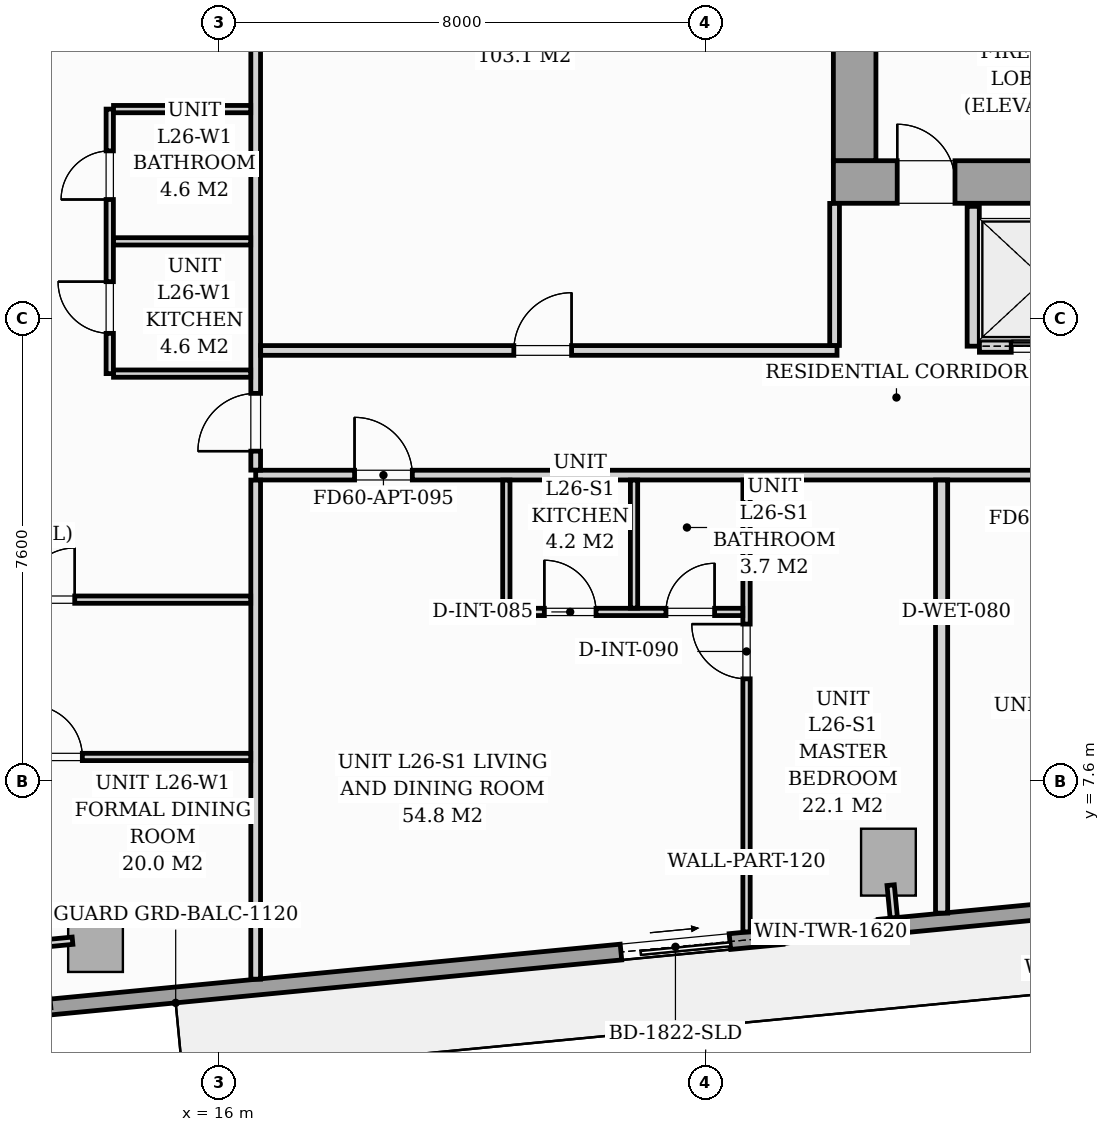
"""IFC4 building model, lengths in metres.
Left out: names, types, materials, properties, quantities, classifications, styles, units other than length and angle.
Written with IfcOpenShell. Run it as: python <this file> out.ifc"""

import sys

from ifc_helpers import new_model, si_unit, direction, frame, frame_2d, origin, origin_2d, place, context, subcontext, project, spatial, rectangle, i_section, extrude, source, transform, mapped, element, fill, save


model = new_model("IFC4")
c1 = context("Model", 3, precision=1e-05, world=origin(), true_north=direction((0.0, 1.0)))
c2 = subcontext(c1, "Body", "Model", "MODEL_VIEW")
j1 = project(units=[si_unit("LENGTHUNIT", "METRE"), si_unit("PLANEANGLEUNIT", "RADIAN")], contexts=[c1])
p1 = place(None, origin())
s1 = spatial("IfcSite", under=j1, at=p1, CompositionType="ELEMENT")
p2 = place(p1, origin())
s2 = spatial("IfcBuilding", under=s1, at=p2, CompositionType="ELEMENT")
p3 = place(p2, frame((0.0, 0.0, 93.8)))
s3 = spatial("IfcBuildingStorey", under=s2, at=p3, CompositionType="ELEMENT", Elevation=93.8)
m1 = source(origin(), c2, "Body", "SweptSolid", [
    extrude(i_section(OverallWidth=0.427, OverallDepth=0.483, WebThickness=0.051, FlangeThickness=0.082, FilletRadius=0.018, at=origin_2d()), origin(), (0.0, 0.0, 1.0), 3.196),
])
p4 = place(p3, frame((26.4, 17.4, 0.002), z_axis=(0.0, 0.0, 1.0), x_axis=(1.0, 0.0, 0.0)))
e1 = element("IfcColumn", 1, at=p4, inside=s3, PredefinedType="PILASTER", context=c2, shape_type="MappedRepresentation", body=[
    mapped(m1, transform((0.0, 0.0, 0.0), scale=1.0)),
])
m2 = source(origin(), c2, "Body", "SweptSolid", [
    extrude(rectangle(XDim=0.9, YDim=1.1, at=origin_2d()), origin(), (0.0, 0.0, 1.0), 3.196),
])
for number, where, z_axis, x_axis in (
    (2, (13.966, 5.01, 0.002), (0.0, 0.0, 1.0), (0.995, 0.096, 0.0)),
    (3, (27.006, 6.265, 0.002), (0.0, 0.0, 1.0), (0.995, 0.096, 0.0)),
):
    element("IfcColumn", number, at=place(p3, frame(where, z_axis=z_axis, x_axis=x_axis)), inside=s3, PredefinedType="COLUMN", context=c2, shape_type="MappedRepresentation", body=[
        mapped(m2, transform((0.0, 0.0, 0.0), scale=1.0)),
    ])
p5 = place(p3, frame((31.994, 5.69, 0.0), z_axis=(0.0, 0.0, 1.0), x_axis=(-0.995396521236, -0.095842399342, 0.0)))
e4 = element("IfcWall", 4, at=p5, inside=s3, PredefinedType="STANDARD", context=c2, shape_type="SweptSolid", body=[
    extrude(rectangle(XDim=19.11, YDim=0.26, at=frame_2d((9.555, 0.0))), origin(), (0.0, 0.0, 1.0), 2.94),
])
p6 = place(p5, frame((7.63, 0.0, 0.0)))
e5 = element("IfcOpeningElement", 5, at=p6, cuts=e4, PredefinedType="OPENING", context=c2, shape_type="SweptSolid", body=[
    extrude(rectangle(XDim=1.8, YDim=2.06, at=frame_2d((0.9, 1.03))), frame((0.0, 0.14, 0.0), z_axis=(0.0, -1.0, 0.0), x_axis=(1.0, 0.0, 0.0)), (0.0, 0.0, 1.0), 0.28),
])
p7 = place(p5, frame((0.7, 0.0, 0.65)))
e6 = element("IfcOpeningElement", 6, at=p7, cuts=e4, PredefinedType="OPENING", context=c2, shape_type="SweptSolid", body=[
    extrude(rectangle(XDim=1.6, YDim=1.5, at=frame_2d((0.8, 0.75))), frame((0.0, 0.14, 0.0), z_axis=(0.0, -1.0, 0.0), x_axis=(1.0, 0.0, 0.0)), (0.0, 0.0, 1.0), 0.28),
])
p8 = place(p5, frame((5.167, 0.0, 0.75)))
e7 = element("IfcOpeningElement", 7, at=p8, cuts=e4, PredefinedType="OPENING", context=c2, shape_type="SweptSolid", body=[
    extrude(rectangle(XDim=1.6, YDim=1.5, at=frame_2d((0.8, 0.75))), frame((0.0, 0.14, 0.0), z_axis=(0.0, -1.0, 0.0), x_axis=(1.0, 0.0, 0.0)), (0.0, 0.0, 1.0), 0.28),
])
p9 = place(p3, frame((26.1, 17.45, 0.0), z_axis=(0.0, 0.0, 1.0), x_axis=(1.0, 0.0, 0.0)))
e8 = element("IfcWall", 8, at=p9, inside=s3, PredefinedType="SHEAR", context=c2, shape_type="SweptSolid", body=[
    extrude(rectangle(XDim=19.8, YDim=0.7, at=frame_2d((9.9, 0.0))), origin(), (0.0, 0.0, 1.0), 3.2),
])
p10 = place(p9, frame((1.05, 0.0, 0.0)))
e9 = element("IfcOpeningElement", 9, at=p10, cuts=e8, PredefinedType="OPENING", context=c2, shape_type="SweptSolid", body=[
    extrude(rectangle(XDim=0.95, YDim=2.06, at=frame_2d((0.475, 1.03))), frame((0.0, 0.36, 0.0), z_axis=(0.0, -1.0, 0.0), x_axis=(1.0, 0.0, 0.0)), (0.0, 0.0, 1.0), 0.72),
])
p11 = place(p9, frame((9.48, 0.0, 0.0)))
e10 = element("IfcOpeningElement", 10, at=p11, cuts=e8, PredefinedType="OPENING", context=c2, shape_type="SweptSolid", body=[
    extrude(rectangle(XDim=0.85, YDim=2.0, at=frame_2d((0.425, 1.0))), frame((0.0, 0.36, 0.0), z_axis=(0.0, -1.0, 0.0), x_axis=(1.0, 0.0, 0.0)), (0.0, 0.0, 1.0), 0.72),
])
p12 = place(p9, frame((17.65, 0.0, 0.0)))
e11 = element("IfcOpeningElement", 11, at=p12, cuts=e8, PredefinedType="OPENING", context=c2, shape_type="SweptSolid", body=[
    extrude(rectangle(XDim=0.95, YDim=2.06, at=frame_2d((0.475, 1.03))), frame((0.0, 0.36, 0.0), z_axis=(0.0, -1.0, 0.0), x_axis=(1.0, 0.0, 0.0)), (0.0, 0.0, 1.0), 0.72),
])
p13 = place(p3, frame((26.45, 17.802, 0.0), z_axis=(0.0, 0.0, 1.0), x_axis=(0.0, 1.0, 0.0)))
e12 = element("IfcWall", 12, at=p13, inside=s3, PredefinedType="SHEAR", context=c2, shape_type="SweptSolid", body=[
    extrude(rectangle(XDim=5.796, YDim=0.7, at=frame_2d((2.898, 0.0))), origin(), (0.0, 0.0, 1.0), 3.2),
])
p14 = place(p3, frame((28.4, 14.75, 0.0), z_axis=(0.0, 0.0, 1.0), x_axis=(0.0, 1.0, 0.0)))
e13 = element("IfcWall", 13, at=p14, inside=s3, PredefinedType="PARTITIONING", context=c2, shape_type="SweptSolid", body=[
    extrude(rectangle(XDim=2.3, YDim=0.2, at=frame_2d((1.15, 0.0))), origin(), (0.0, 0.0, 1.0), 2.94),
])
p15 = place(p3, frame((28.502, 14.75, 0.0), z_axis=(0.0, 0.0, 1.0), x_axis=(1.0, 0.0, 0.0)))
e14 = element("IfcWall", 14, at=p15, inside=s3, PredefinedType="PARTITIONING", context=c2, shape_type="SweptSolid", body=[
    extrude(rectangle(XDim=2.146, YDim=0.2, at=frame_2d((1.073, 0.0))), origin(), (0.0, 0.0, 1.0), 2.94),
])
p16 = place(p15, frame((0.523, 0.0, 0.0)))
e15 = element("IfcOpeningElement", 15, at=p16, cuts=e14, PredefinedType="OPENING", context=c2, shape_type="SweptSolid", body=[
    extrude(rectangle(XDim=1.05, YDim=2.08, at=frame_2d((0.525, 1.04))), frame((0.0, 0.11, 0.0), z_axis=(0.0, -1.0, 0.0), x_axis=(1.0, 0.0, 0.0)), (0.0, 0.0, 1.0), 0.22),
])
p17 = place(p3, frame((16.6, 12.63, 0.0), z_axis=(0.0, 0.0, 1.0), x_axis=(1.0, 0.0, 0.0)))
e16 = element("IfcWall", 16, at=p17, inside=s3, PredefinedType="PARTITIONING", context=c2, shape_type="SweptSolid", body=[
    extrude(rectangle(XDim=37.6, YDim=0.16, at=frame_2d((18.8, 0.0))), origin(), (0.0, 0.0, 1.0), 2.94),
])
p18 = place(p17, frame((1.626, 0.0, 0.0)))
e17 = element("IfcOpeningElement", 17, at=p18, cuts=e16, PredefinedType="OPENING", context=c2, shape_type="SweptSolid", body=[
    extrude(rectangle(XDim=0.95, YDim=2.06, at=frame_2d((0.475, 1.03))), frame((0.0, 0.09, 0.0), z_axis=(0.0, -1.0, 0.0), x_axis=(1.0, 0.0, 0.0)), (0.0, 0.0, 1.0), 0.18),
])
p19 = place(p17, frame((13.46, 0.0, 0.0)))
e18 = element("IfcOpeningElement", 18, at=p19, cuts=e16, PredefinedType="OPENING", context=c2, shape_type="SweptSolid", body=[
    extrude(rectangle(XDim=0.95, YDim=2.06, at=frame_2d((0.475, 1.03))), frame((0.0, 0.09, 0.0), z_axis=(0.0, -1.0, 0.0), x_axis=(1.0, 0.0, 0.0)), (0.0, 0.0, 1.0), 0.18),
])
p20 = place(p17, frame((26.522, 0.0, 0.0)))
e19 = element("IfcOpeningElement", 19, at=p20, cuts=e16, PredefinedType="OPENING", context=c2, shape_type="SweptSolid", body=[
    extrude(rectangle(XDim=0.95, YDim=2.06, at=frame_2d((0.475, 1.03))), frame((0.0, 0.09, 0.0), z_axis=(0.0, -1.0, 0.0), x_axis=(1.0, 0.0, 0.0)), (0.0, 0.0, 1.0), 0.18),
])
p21 = place(p3, frame((16.6, 4.341, 0.0), z_axis=(0.0, 0.0, 1.0), x_axis=(0.0, 1.0, 0.0)))
e20 = element("IfcWall", 20, at=p21, inside=s3, PredefinedType="PARTITIONING", context=c2, shape_type="SweptSolid", body=[
    extrude(rectangle(XDim=8.207, YDim=0.16, at=frame_2d((4.104, 0.0))), origin(), (0.0, 0.0, 1.0), 2.94),
])
p22 = place(p3, frame((16.6, 12.712, 0.0), z_axis=(0.0, 0.0, 1.0), x_axis=(0.0, 1.0, 0.0)))
e21 = element("IfcWall", 21, at=p22, inside=s3, PredefinedType="PARTITIONING", context=c2, shape_type="SweptSolid", body=[
    extrude(rectangle(XDim=11.195, YDim=0.16, at=frame_2d((5.598, 0.0))), origin(), (0.0, 0.0, 1.0), 2.94),
])
p23 = place(p22, frame((0.312, 0.0, 0.0)))
e22 = element("IfcOpeningElement", 22, at=p23, cuts=e21, PredefinedType="OPENING", context=c2, shape_type="SweptSolid", body=[
    extrude(rectangle(XDim=0.95, YDim=2.06, at=frame_2d((0.475, 1.03))), frame((0.0, 0.09, 0.0), z_axis=(0.0, -1.0, 0.0), x_axis=(1.0, 0.0, 0.0)), (0.0, 0.0, 1.0), 0.18),
])
p24 = place(p3, frame((24.672, 5.118, 0.0), z_axis=(0.0, 0.0, 1.0), x_axis=(0.0, 1.0, 0.0)))
e23 = element("IfcWall", 23, at=p24, inside=s3, PredefinedType="PARTITIONING", context=c2, shape_type="SweptSolid", body=[
    extrude(rectangle(XDim=7.43, YDim=0.12, at=frame_2d((3.715, 0.0))), origin(), (0.0, 0.0, 1.0), 2.94),
])
p25 = place(p24, frame((4.162, 0.0, 0.0)))
e24 = element("IfcOpeningElement", 24, at=p25, cuts=e23, PredefinedType="OPENING", context=c2, shape_type="SweptSolid", body=[
    extrude(rectangle(XDim=0.9, YDim=2.05, at=frame_2d((0.45, 1.025))), frame((0.0, 0.07, 0.0), z_axis=(0.0, -1.0, 0.0), x_axis=(1.0, 0.0, 0.0)), (0.0, 0.0, 1.0), 0.14),
])
p26 = place(p3, frame((20.722, 10.38, 0.0), z_axis=(0.0, 0.0, 1.0), x_axis=(1.0, 0.0, 0.0)))
e25 = element("IfcWall", 25, at=p26, inside=s3, PredefinedType="PARTITIONING", context=c2, shape_type="SweptSolid", body=[
    extrude(rectangle(XDim=3.888, YDim=0.12, at=frame_2d((1.944, 0.0))), origin(), (0.0, 0.0, 1.0), 2.94),
])
p27 = place(p26, frame((0.625, 0.0, 0.0)))
e26 = element("IfcOpeningElement", 26, at=p27, cuts=e25, PredefinedType="OPENING", context=c2, shape_type="SweptSolid", body=[
    extrude(rectangle(XDim=0.85, YDim=2.05, at=frame_2d((0.425, 1.025))), frame((0.0, 0.07, 0.0), z_axis=(0.0, -1.0, 0.0), x_axis=(1.0, 0.0, 0.0)), (0.0, 0.0, 1.0), 0.14),
])
p28 = place(p26, frame((2.625, 0.0, 0.0)))
e27 = element("IfcOpeningElement", 27, at=p28, cuts=e25, PredefinedType="OPENING", context=c2, shape_type="SweptSolid", body=[
    extrude(rectangle(XDim=0.8, YDim=2.02, at=frame_2d((0.4, 1.01))), frame((0.0, 0.07, 0.0), z_axis=(0.0, -1.0, 0.0), x_axis=(1.0, 0.0, 0.0)), (0.0, 0.0, 1.0), 0.14),
])
for number, where, z_axis, x_axis in (
    (28, (22.822, 10.442, 0.0), (0.0, 0.0, 1.0), (0.0, 1.0, 0.0)),
    (29, (20.722, 10.442, 0.0), (0.0, 0.0, 1.0), (0.0, 1.0, 0.0)),
):
    element("IfcWall", number, at=place(p3, frame(where, z_axis=z_axis, x_axis=x_axis)), inside=s3, PredefinedType="PARTITIONING", context=c2, shape_type="SweptSolid", body=[
        extrude(rectangle(XDim=2.106, YDim=0.12, at=frame_2d((1.053, 0.0))), origin(), (0.0, 0.0, 1.0), 2.94),
    ])
p29 = place(p3, frame((27.88, 5.427, 0.0), z_axis=(0.0, 0.0, 1.0), x_axis=(0.0, 1.0, 0.0)))
e30 = element("IfcWall", 30, at=p29, inside=s3, PredefinedType="PARTITIONING", context=c2, shape_type="SweptSolid", body=[
    extrude(rectangle(XDim=7.121, YDim=0.2, at=frame_2d((3.561, 0.0))), origin(), (0.0, 0.0, 1.0), 2.94),
])
p30 = place(p3, frame((14.2, 14.299, 0.0), z_axis=(0.0, 0.0, 1.0), x_axis=(0.0, 1.0, 0.0)))
e31 = element("IfcWall", 31, at=p30, inside=s3, PredefinedType="PARTITIONING", context=c2, shape_type="SweptSolid", body=[
    extrude(rectangle(XDim=4.35, YDim=0.12, at=frame_2d((2.175, 0.0))), origin(), (0.0, 0.0, 1.0), 2.94),
])
p31 = place(p30, frame((0.662, 0.0, 0.0)))
e32 = element("IfcOpeningElement", 32, at=p31, cuts=e31, PredefinedType="OPENING", context=c2, shape_type="SweptSolid", body=[
    extrude(rectangle(XDim=0.85, YDim=2.05, at=frame_2d((0.425, 1.025))), frame((0.0, 0.07, 0.0), z_axis=(0.0, -1.0, 0.0), x_axis=(1.0, 0.0, 0.0)), (0.0, 0.0, 1.0), 0.14),
])
p32 = place(p30, frame((2.863, 0.0, 0.0)))
e33 = element("IfcOpeningElement", 33, at=p32, cuts=e31, PredefinedType="OPENING", context=c2, shape_type="SweptSolid", body=[
    extrude(rectangle(XDim=0.8, YDim=2.02, at=frame_2d((0.4, 1.01))), frame((0.0, 0.07, 0.0), z_axis=(0.0, -1.0, 0.0), x_axis=(1.0, 0.0, 0.0)), (0.0, 0.0, 1.0), 0.14),
])
p33 = place(p3, frame((14.262, 16.474, 0.0), z_axis=(0.0, 0.0, 1.0), x_axis=(1.0, 0.0, 0.0)))
e34 = element("IfcWall", 34, at=p33, inside=s3, PredefinedType="PARTITIONING", context=c2, shape_type="SweptSolid", body=[
    extrude(rectangle(XDim=2.256, YDim=0.12, at=frame_2d((1.128, 0.0))), origin(), (0.0, 0.0, 1.0), 2.94),
])
p34 = place(p3, frame((14.262, 14.299, 0.0), z_axis=(0.0, 0.0, 1.0), x_axis=(1.0, 0.0, 0.0)))
e35 = element("IfcWall", 35, at=p34, inside=s3, PredefinedType="PARTITIONING", context=c2, shape_type="SweptSolid", body=[
    extrude(rectangle(XDim=2.256, YDim=0.12, at=frame_2d((1.128, 0.0))), origin(), (0.0, 0.0, 1.0), 2.063),
])
p35 = place(p3, frame((14.262, 18.649, 0.0), z_axis=(0.0, 0.0, 1.0), x_axis=(1.0, 0.0, 0.0)))
e36 = element("IfcWall", 36, at=p35, inside=s3, PredefinedType="PARTITIONING", context=c2, shape_type="SweptSolid", body=[
    extrude(rectangle(XDim=2.256, YDim=0.12, at=frame_2d((1.128, 0.0))), origin(), (0.0, 0.0, 1.0), 2.94),
])
p36 = place(p3, frame((10.142, 7.995, 0.0), z_axis=(0.0, 0.0, 1.0), x_axis=(1.0, 0.0, 0.0)))
e37 = element("IfcWall", 37, at=p36, inside=s3, PredefinedType="PARTITIONING", context=c2, shape_type="SweptSolid", body=[
    extrude(rectangle(XDim=6.376, YDim=0.12, at=frame_2d((3.188, 0.0))), origin(), (0.0, 0.0, 1.0), 2.94),
])
p37 = place(p36, frame((2.757, 0.0, 0.0)))
e38 = element("IfcOpeningElement", 38, at=p37, cuts=e37, PredefinedType="OPENING", context=c2, shape_type="SweptSolid", body=[
    extrude(rectangle(XDim=0.85, YDim=2.05, at=frame_2d((0.425, 1.025))), frame((0.0, 0.07, 0.0), z_axis=(0.0, -1.0, 0.0), x_axis=(1.0, 0.0, 0.0)), (0.0, 0.0, 1.0), 0.14),
])
p38 = place(p3, frame((9.893, 10.582, 0.0), z_axis=(0.0, 0.0, 1.0), x_axis=(1.0, 0.0, 0.0)))
e39 = element("IfcWall", 39, at=p38, inside=s3, PredefinedType="PARTITIONING", context=c2, shape_type="SweptSolid", body=[
    extrude(rectangle(XDim=6.625, YDim=0.12, at=frame_2d((3.312, 0.0))), origin(), (0.0, 0.0, 1.0), 2.94),
])
p39 = place(p38, frame((2.881, 0.0, 0.0)))
e40 = element("IfcOpeningElement", 40, at=p39, cuts=e39, PredefinedType="OPENING", context=c2, shape_type="SweptSolid", body=[
    extrude(rectangle(XDim=0.85, YDim=2.05, at=frame_2d((0.425, 1.025))), frame((0.0, 0.07, 0.0), z_axis=(0.0, -1.0, 0.0), x_axis=(1.0, 0.0, 0.0)), (0.0, 0.0, 1.0), 0.14),
])
p40 = place(p3, frame((16.682, 14.68, 0.0), z_axis=(0.0, 0.0, 1.0), x_axis=(1.0, 0.0, 0.0)))
e41 = element("IfcWall", 41, at=p40, inside=s3, PredefinedType="PARTITIONING", context=c2, shape_type="SweptSolid", body=[
    extrude(rectangle(XDim=9.478, YDim=0.16, at=frame_2d((4.739, 0.0))), origin(), (0.0, 0.0, 1.0), 2.94),
])
p41 = place(p40, frame((4.163, 0.0, 0.0)))
e42 = element("IfcOpeningElement", 42, at=p41, cuts=e41, PredefinedType="OPENING", context=c2, shape_type="SweptSolid", body=[
    extrude(rectangle(XDim=0.95, YDim=2.06, at=frame_2d((0.475, 1.03))), frame((0.0, 0.09, 0.0), z_axis=(0.0, -1.0, 0.0), x_axis=(1.0, 0.0, 0.0)), (0.0, 0.0, 1.0), 0.18),
])
p42 = place(p3, frame((26.12, 14.762, 0.0), z_axis=(0.0, 0.0, 1.0), x_axis=(0.0, 1.0, 0.0)))
e43 = element("IfcWall", 43, at=p42, inside=s3, PredefinedType="PARTITIONING", context=c2, shape_type="SweptSolid", body=[
    extrude(rectangle(XDim=2.336, YDim=0.16, at=frame_2d((1.168, 0.0))), origin(), (0.0, 0.0, 1.0), 2.94),
])
p43 = place(p3, frame((13.588, 4.973, 0.0), z_axis=(0.0, 0.0, 1.0), x_axis=(-0.995435366701, -0.095438098896, 0.0)))
e44 = element("IfcWall", 44, at=p43, inside=s3, PredefinedType="PARTITIONING", context=c2, shape_type="SweptSolid", body=[
    extrude(rectangle(XDim=0.458, YDim=0.12, at=frame_2d((0.229, 0.0))), origin(), (0.0, 0.0, 1.0), 2.94),
])
p44 = place(p3, frame((27.042, 5.887, 0.0), z_axis=(0.0, 0.0, 1.0), x_axis=(0.096222656154, -0.995359834654, 0.0)))
e45 = element("IfcWall", 45, at=p44, inside=s3, PredefinedType="PARTITIONING", context=c2, shape_type="SweptSolid", body=[
    extrude(rectangle(XDim=0.538, YDim=0.12, at=frame_2d((0.269, 0.0))), origin(), (0.0, 0.0, 1.0), 2.94),
])
m3 = source(origin(), c2, "Body", "SweptSolid", [
    extrude(rectangle(XDim=1.8, YDim=2.06, at=frame_2d((0.9, 1.03))), frame((0.0, 0.025, 0.0), z_axis=(0.0, -1.0, 0.0), x_axis=(1.0, 0.0, 0.0)), (0.0, 0.0, 1.0), 0.05),
])
p45 = place(p6, origin())
e46 = element("IfcDoor", 46, at=p45, inside=s3, OperationType="SLIDING_TO_LEFT", PredefinedType="DOOR", context=c2, shape_type="MappedRepresentation", body=[
    mapped(m3, transform((0.0, 0.0, 0.0), scale=1.0)),
])
fill(e5, e46)
m4 = source(origin(), c2, "Body", "SweptSolid", [
    extrude(rectangle(XDim=1.6, YDim=1.5, at=frame_2d((0.8, 0.75))), frame((0.0, 0.03, 0.0), z_axis=(0.0, -1.0, 0.0), x_axis=(1.0, 0.0, 0.0)), (0.0, 0.0, 1.0), 0.06),
])
p46 = place(p8, origin())
e47 = element("IfcWindow", 47, at=p46, inside=s3, PartitioningType="SINGLE_PANEL", PredefinedType="WINDOW", context=c2, shape_type="MappedRepresentation", body=[
    mapped(m4, transform((0.0, 0.0, 0.0), scale=1.0)),
])
fill(e7, e47)
m5 = source(origin(), c2, "Body", "SweptSolid", [
    extrude(rectangle(XDim=0.95, YDim=2.06, at=frame_2d((0.475, 1.03))), frame((0.0, 0.025, 0.0), z_axis=(0.0, -1.0, 0.0), x_axis=(1.0, 0.0, 0.0)), (0.0, 0.0, 1.0), 0.05),
])
p47 = place(p10, origin())
e48 = element("IfcDoor", 48, at=p47, inside=s3, OperationType="SINGLE_SWING_LEFT", PredefinedType="DOOR", context=c2, shape_type="MappedRepresentation", body=[
    mapped(m5, transform((0.0, 0.0, 0.0), scale=1.0)),
])
fill(e9, e48)
m6 = source(origin(), c2, "Body", "SweptSolid", [
    extrude(rectangle(XDim=1.05, YDim=2.08, at=frame_2d((0.525, 1.04))), frame((0.0, 0.025, 0.0), z_axis=(0.0, -1.0, 0.0), x_axis=(1.0, 0.0, 0.0)), (0.0, 0.0, 1.0), 0.05),
])
p48 = place(p16, origin())
e49 = element("IfcDoor", 49, at=p48, inside=s3, OperationType="SLIDING_TO_LEFT", PredefinedType="DOOR", context=c2, shape_type="MappedRepresentation", body=[
    mapped(m6, transform((0.0, 0.0, 0.0), scale=1.0)),
])
fill(e15, e49)
m7 = source(origin(), c2, "Body", "SweptSolid", [
    extrude(rectangle(XDim=0.95, YDim=2.06, at=frame_2d((0.475, 1.03))), frame((0.0, 0.025, 0.0), z_axis=(0.0, -1.0, 0.0), x_axis=(1.0, 0.0, 0.0)), (0.0, 0.0, 1.0), 0.05),
])
p49 = place(p18, origin())
e50 = element("IfcDoor", 50, at=p49, inside=s3, OperationType="SINGLE_SWING_LEFT", PredefinedType="DOOR", context=c2, shape_type="MappedRepresentation", body=[
    mapped(m7, transform((0.0, 0.0, 0.0), scale=1.0)),
])
fill(e17, e50)
m8 = source(origin(), c2, "Body", "SweptSolid", [
    extrude(rectangle(XDim=0.9, YDim=2.05, at=frame_2d((0.45, 1.025))), frame((0.0, 0.025, 0.0), z_axis=(0.0, -1.0, 0.0), x_axis=(1.0, 0.0, 0.0)), (0.0, 0.0, 1.0), 0.05),
])
p50 = place(p25, origin())
e51 = element("IfcDoor", 51, at=p50, inside=s3, OperationType="SINGLE_SWING_RIGHT", PredefinedType="DOOR", context=c2, shape_type="MappedRepresentation", body=[
    mapped(m8, transform((0.0, 0.0, 0.0), scale=1.0)),
])
fill(e24, e51)
m9 = source(origin(), c2, "Body", "SweptSolid", [
    extrude(rectangle(XDim=0.85, YDim=2.05, at=frame_2d((0.425, 1.025))), frame((0.0, 0.025, 0.0), z_axis=(0.0, -1.0, 0.0), x_axis=(1.0, 0.0, 0.0)), (0.0, 0.0, 1.0), 0.05),
])
p51 = place(p27, origin())
e52 = element("IfcDoor", 52, at=p51, inside=s3, OperationType="SINGLE_SWING_LEFT", PredefinedType="DOOR", context=c2, shape_type="MappedRepresentation", body=[
    mapped(m9, transform((0.0, 0.0, 0.0), scale=1.0)),
])
fill(e26, e52)
m10 = source(origin(), c2, "Body", "SweptSolid", [
    extrude(rectangle(XDim=0.8, YDim=2.02, at=frame_2d((0.4, 1.01))), frame((0.0, 0.025, 0.0), z_axis=(0.0, -1.0, 0.0), x_axis=(1.0, 0.0, 0.0)), (0.0, 0.0, 1.0), 0.05),
])
p52 = place(p28, origin())
e53 = element("IfcDoor", 53, at=p52, inside=s3, OperationType="SINGLE_SWING_RIGHT", PredefinedType="DOOR", context=c2, shape_type="MappedRepresentation", body=[
    mapped(m10, transform((0.0, 0.0, 0.0), scale=1.0)),
])
fill(e27, e53)
p53 = place(p23, origin())
e54 = element("IfcDoor", 54, at=p53, inside=s3, OperationType="SINGLE_SWING_LEFT", PredefinedType="DOOR", context=c2, shape_type="MappedRepresentation", body=[
    mapped(m7, transform((0.0, 0.0, 0.0), scale=1.0)),
])
fill(e22, e54)
p54 = place(p31, origin())
e55 = element("IfcDoor", 55, at=p54, inside=s3, OperationType="SINGLE_SWING_RIGHT", PredefinedType="DOOR", context=c2, shape_type="MappedRepresentation", body=[
    mapped(m9, transform((0.0, 0.0, 0.0), scale=1.0)),
])
fill(e32, e55)
p55 = place(p32, origin())
e56 = element("IfcDoor", 56, at=p55, inside=s3, OperationType="SINGLE_SWING_LEFT", PredefinedType="DOOR", context=c2, shape_type="MappedRepresentation", body=[
    mapped(m10, transform((0.0, 0.0, 0.0), scale=1.0)),
])
fill(e33, e56)
p56 = place(p37, origin())
e57 = element("IfcDoor", 57, at=p56, inside=s3, OperationType="SINGLE_SWING_LEFT", PredefinedType="DOOR", context=c2, shape_type="MappedRepresentation", body=[
    mapped(m9, transform((0.0, 0.0, 0.0), scale=1.0)),
])
fill(e38, e57)
p57 = place(p39, origin())
e58 = element("IfcDoor", 58, at=p57, inside=s3, OperationType="SINGLE_SWING_RIGHT", PredefinedType="DOOR", context=c2, shape_type="MappedRepresentation", body=[
    mapped(m9, transform((0.0, 0.0, 0.0), scale=1.0)),
])
fill(e40, e58)
p58 = place(p41, origin())
e59 = element("IfcDoor", 59, at=p58, inside=s3, OperationType="SINGLE_SWING_RIGHT", PredefinedType="DOOR", context=c2, shape_type="MappedRepresentation", body=[
    mapped(m7, transform((0.0, 0.0, 0.0), scale=1.0)),
])
fill(e42, e59)
save(model, sys.argv[1])
